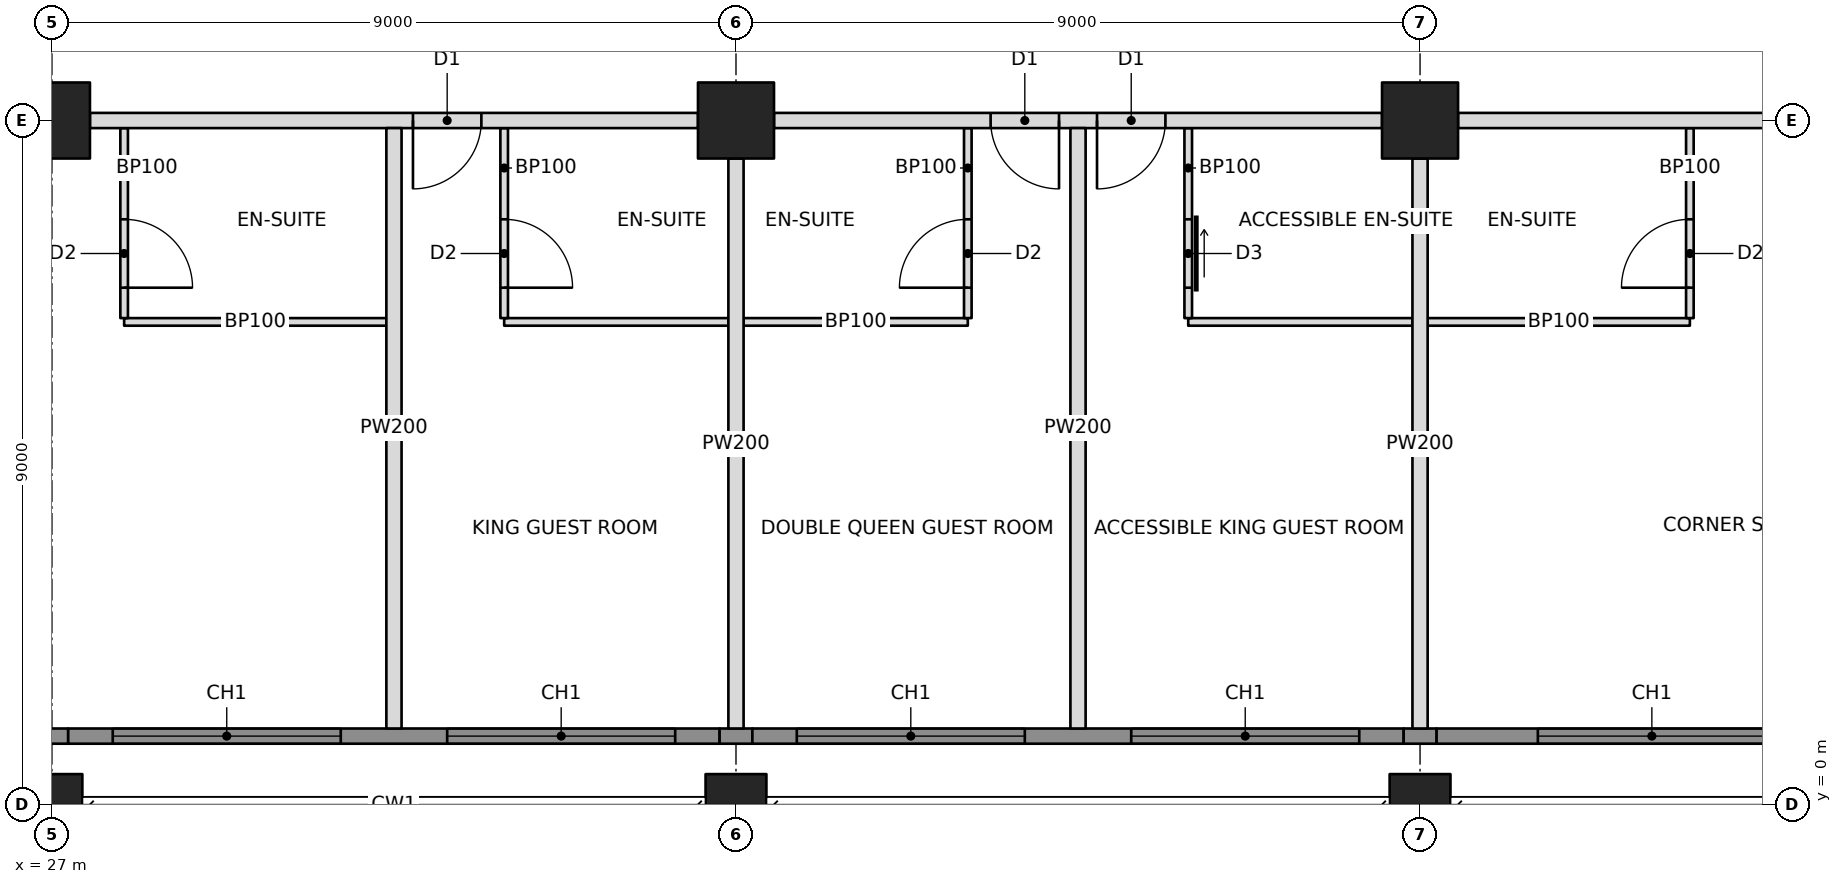
"""IFC4 building model, lengths in metres.
Left out: names, types, materials, properties, quantities, classifications, styles, units other than length and angle.
Written with IfcOpenShell. Run it as: python <this file> out.ifc"""

import sys

from ifc_helpers import new_model, si_unit, direction, frame, frame_2d, origin, origin_2d, place, context, subcontext, project, spatial, rectangle, hollow_rectangle, extrude, element, fill, save


model = new_model("IFC4")
c1 = context("Model", 3, precision=1e-05, world=origin(), true_north=direction((0.0, 1.0)))
c2 = subcontext(c1, "Body", "Model", "MODEL_VIEW")
j1 = project(units=[si_unit("LENGTHUNIT", "METRE"), si_unit("PLANEANGLEUNIT", "RADIAN")], contexts=[c1])
p1 = place(None, origin())
s1 = spatial("IfcSite", under=j1, at=p1, CompositionType="ELEMENT")
p2 = place(p1, origin())
s2 = spatial("IfcBuilding", under=s1, at=p2, CompositionType="ELEMENT")
p3 = place(p2, frame((0.0, 0.0, 85.8)))
s3 = spatial("IfcBuildingStorey", under=s2, at=p3, CompositionType="ELEMENT", Elevation=85.8)
p4 = place(p3, frame((27.0, 0.0, 0.0), z_axis=(0.0, 0.0, 1.0), x_axis=(1.0, 0.0, 0.0)))
e1 = element("IfcColumn", 1, at=p4, inside=s3, PredefinedType="COLUMN", context=c2, shape_type="SweptSolid", body=[
    extrude(hollow_rectangle(XDim=0.8, YDim=0.8, WallThickness=0.07, at=origin_2d()), origin(), (0.0, 0.0, 1.0), 3.4),
])
p5 = place(p3, frame((27.0, 9.0, 0.0), z_axis=(0.0, 0.0, 1.0), x_axis=(1.0, 0.0, 0.0)))
e2 = element("IfcColumn", 2, at=p5, inside=s3, PredefinedType="COLUMN", context=c2, shape_type="SweptSolid", body=[
    extrude(hollow_rectangle(XDim=1.0, YDim=1.0, WallThickness=0.1, at=origin_2d()), origin(), (0.0, 0.0, 1.0), 3.4),
])
p6 = place(p3, frame((36.0, 0.0, 0.0), z_axis=(0.0, 0.0, 1.0), x_axis=(1.0, 0.0, 0.0)))
e3 = element("IfcColumn", 3, at=p6, inside=s3, PredefinedType="COLUMN", context=c2, shape_type="SweptSolid", body=[
    extrude(hollow_rectangle(XDim=0.8, YDim=0.8, WallThickness=0.07, at=origin_2d()), origin(), (0.0, 0.0, 1.0), 3.4),
])
p7 = place(p3, frame((36.0, 9.0, 0.0), z_axis=(0.0, 0.0, 1.0), x_axis=(0.0, 1.0, 0.0)))
e4 = element("IfcColumn", 4, at=p7, inside=s3, PredefinedType="COLUMN", context=c2, shape_type="SweptSolid", body=[
    extrude(hollow_rectangle(XDim=1.0, YDim=1.0, WallThickness=0.1, at=origin_2d()), origin(), (0.0, 0.0, 1.0), 3.4),
])
p8 = place(p3, frame((45.0, 0.0, 0.0), z_axis=(0.0, 0.0, 1.0), x_axis=(1.0, 0.0, 0.0)))
e5 = element("IfcColumn", 5, at=p8, inside=s3, PredefinedType="COLUMN", context=c2, shape_type="SweptSolid", body=[
    extrude(hollow_rectangle(XDim=0.8, YDim=0.8, WallThickness=0.07, at=origin_2d()), origin(), (0.0, 0.0, 1.0), 3.4),
])
p9 = place(p3, frame((45.0, 9.0, 0.0), z_axis=(0.0, 0.0, 1.0), x_axis=(0.0, 1.0, 0.0)))
e6 = element("IfcColumn", 6, at=p9, inside=s3, PredefinedType="COLUMN", context=c2, shape_type="SweptSolid", body=[
    extrude(hollow_rectangle(XDim=1.0, YDim=1.0, WallThickness=0.1, at=origin_2d()), origin(), (0.0, 0.0, 1.0), 3.4),
])
p10 = place(p3, frame((27.5, 9.0, 0.0), z_axis=(0.0, 0.0, 1.0), x_axis=(1.0, 0.0, 0.0)))
e7 = element("IfcWall", 7, at=p10, inside=s3, PredefinedType="PARTITIONING", context=c2, shape_type="SweptSolid", body=[
    extrude(rectangle(XDim=8.0, YDim=0.2, at=frame_2d((4.0, 0.0))), origin(), (0.0, 0.0, 1.0), 2.21),
])
p11 = place(p10, frame((4.25, 0.0, 0.0)))
e8 = element("IfcOpeningElement", 8, at=p11, cuts=e7, PredefinedType="OPENING", context=c2, shape_type="SweptSolid", body=[
    extrude(rectangle(XDim=0.9, YDim=2.1, at=frame_2d((0.45, 1.05))), frame((0.0, 0.11, 0.0), z_axis=(0.0, -1.0, 0.0), x_axis=(1.0, 0.0, 0.0)), (0.0, 0.0, 1.0), 0.22),
])
p12 = place(p3, frame((36.5, 9.0, 0.0), z_axis=(0.0, 0.0, 1.0), x_axis=(1.0, 0.0, 0.0)))
e9 = element("IfcWall", 9, at=p12, inside=s3, PredefinedType="PARTITIONING", context=c2, shape_type="SweptSolid", body=[
    extrude(rectangle(XDim=8.0, YDim=0.2, at=frame_2d((4.0, 0.0))), origin(), (0.0, 0.0, 1.0), 2.21),
])
p13 = place(p12, frame((2.85, 0.0, 0.0)))
e10 = element("IfcOpeningElement", 10, at=p13, cuts=e9, PredefinedType="OPENING", context=c2, shape_type="SweptSolid", body=[
    extrude(rectangle(XDim=0.9, YDim=2.1, at=frame_2d((0.45, 1.05))), frame((0.0, 0.11, 0.0), z_axis=(0.0, -1.0, 0.0), x_axis=(1.0, 0.0, 0.0)), (0.0, 0.0, 1.0), 0.22),
])
p14 = place(p12, frame((4.25, 0.0, 0.0)))
e11 = element("IfcOpeningElement", 11, at=p14, cuts=e9, PredefinedType="OPENING", context=c2, shape_type="SweptSolid", body=[
    extrude(rectangle(XDim=0.9, YDim=2.1, at=frame_2d((0.45, 1.05))), frame((0.0, 0.11, 0.0), z_axis=(0.0, -1.0, 0.0), x_axis=(1.0, 0.0, 0.0)), (0.0, 0.0, 1.0), 0.22),
])
p15 = place(p3, frame((45.5, 9.0, 0.0), z_axis=(0.0, 0.0, 1.0), x_axis=(1.0, 0.0, 0.0)))
e12 = element("IfcWall", 12, at=p15, inside=s3, PredefinedType="PARTITIONING", context=c2, shape_type="SweptSolid", body=[
    extrude(rectangle(XDim=7.5, YDim=0.2, at=frame_2d((3.75, 0.0))), origin(), (0.0, 0.0, 1.0), 2.21),
])
p16 = place(p15, frame((6.35, 0.0, 0.0)))
e13 = element("IfcOpeningElement", 13, at=p16, cuts=e12, PredefinedType="OPENING", context=c2, shape_type="SweptSolid", body=[
    extrude(rectangle(XDim=0.9, YDim=2.1, at=frame_2d((0.45, 1.05))), frame((0.0, 0.11, 0.0), z_axis=(0.0, -1.0, 0.0), x_axis=(1.0, 0.0, 0.0)), (0.0, 0.0, 1.0), 0.22),
])
p17 = place(p3, frame((31.5, 8.9, 0.0), z_axis=(0.0, 0.0, 1.0), x_axis=(0.0, -1.0, 0.0)))
e14 = element("IfcWall", 14, at=p17, inside=s3, PredefinedType="PARTITIONING", context=c2, shape_type="SweptSolid", body=[
    extrude(rectangle(XDim=7.9, YDim=0.2, at=frame_2d((3.95, 0.0))), origin(), (0.0, 0.0, 1.0), 2.21),
])
p18 = place(p3, frame((36.0, 8.5, 0.0), z_axis=(0.0, 0.0, 1.0), x_axis=(0.0, -1.0, 0.0)))
e15 = element("IfcWall", 15, at=p18, inside=s3, PredefinedType="PARTITIONING", context=c2, shape_type="SweptSolid", body=[
    extrude(rectangle(XDim=7.5, YDim=0.2, at=frame_2d((3.75, 0.0))), origin(), (0.0, 0.0, 1.0), 2.21),
])
p19 = place(p3, frame((40.5, 8.9, 0.0), z_axis=(0.0, 0.0, 1.0), x_axis=(0.0, -1.0, 0.0)))
e16 = element("IfcWall", 16, at=p19, inside=s3, PredefinedType="PARTITIONING", context=c2, shape_type="SweptSolid", body=[
    extrude(rectangle(XDim=7.9, YDim=0.2, at=frame_2d((3.95, 0.0))), origin(), (0.0, 0.0, 1.0), 2.21),
])
p20 = place(p3, frame((45.0, 8.5, 0.0), z_axis=(0.0, 0.0, 1.0), x_axis=(0.0, -1.0, 0.0)))
e17 = element("IfcWall", 17, at=p20, inside=s3, PredefinedType="PARTITIONING", context=c2, shape_type="SweptSolid", body=[
    extrude(rectangle(XDim=7.5, YDim=0.2, at=frame_2d((3.75, 0.0))), origin(), (0.0, 0.0, 1.0), 2.21),
])
p21 = place(p3, frame((27.95, 6.35, 0.0), z_axis=(0.0, 0.0, 1.0), x_axis=(1.0, 0.0, 0.0)))
e18 = element("IfcWall", 18, at=p21, inside=s3, PredefinedType="PARTITIONING", context=c2, shape_type="SweptSolid", body=[
    extrude(rectangle(XDim=3.45, YDim=0.1, at=frame_2d((1.725, 0.0))), origin(), (0.0, 0.0, 1.0), 3.15),
])
p22 = place(p3, frame((27.95, 8.9, 0.0), z_axis=(0.0, 0.0, 1.0), x_axis=(0.0, -1.0, 0.0)))
e19 = element("IfcWall", 19, at=p22, inside=s3, PredefinedType="PARTITIONING", context=c2, shape_type="SweptSolid", body=[
    extrude(rectangle(XDim=2.5, YDim=0.1, at=frame_2d((1.25, 0.0))), origin(), (0.0, 0.0, 1.0), 2.21),
])
p23 = place(p22, frame((1.2, 0.0, 0.0)))
e20 = element("IfcOpeningElement", 20, at=p23, cuts=e19, PredefinedType="OPENING", context=c2, shape_type="SweptSolid", body=[
    extrude(rectangle(XDim=0.9, YDim=2.1, at=frame_2d((0.45, 1.05))), frame((0.0, 0.06, 0.0), z_axis=(0.0, -1.0, 0.0), x_axis=(1.0, 0.0, 0.0)), (0.0, 0.0, 1.0), 0.12),
])
p24 = place(p3, frame((32.95, 6.35, 0.0), z_axis=(0.0, 0.0, 1.0), x_axis=(1.0, 0.0, 0.0)))
e21 = element("IfcWall", 21, at=p24, inside=s3, PredefinedType="PARTITIONING", context=c2, shape_type="SweptSolid", body=[
    extrude(rectangle(XDim=2.95, YDim=0.1, at=frame_2d((1.475, 0.0))), origin(), (0.0, 0.0, 1.0), 2.21),
])
p25 = place(p3, frame((32.95, 8.9, 0.0), z_axis=(0.0, 0.0, 1.0), x_axis=(0.0, -1.0, 0.0)))
e22 = element("IfcWall", 22, at=p25, inside=s3, PredefinedType="PARTITIONING", context=c2, shape_type="SweptSolid", body=[
    extrude(rectangle(XDim=2.5, YDim=0.1, at=frame_2d((1.25, 0.0))), origin(), (0.0, 0.0, 1.0), 2.21),
])
p26 = place(p25, frame((1.2, 0.0, 0.0)))
e23 = element("IfcOpeningElement", 23, at=p26, cuts=e22, PredefinedType="OPENING", context=c2, shape_type="SweptSolid", body=[
    extrude(rectangle(XDim=0.9, YDim=2.1, at=frame_2d((0.45, 1.05))), frame((0.0, 0.06, 0.0), z_axis=(0.0, -1.0, 0.0), x_axis=(1.0, 0.0, 0.0)), (0.0, 0.0, 1.0), 0.12),
])
p27 = place(p3, frame((36.1, 6.35, 0.0), z_axis=(0.0, 0.0, 1.0), x_axis=(1.0, 0.0, 0.0)))
e24 = element("IfcWall", 24, at=p27, inside=s3, PredefinedType="PARTITIONING", context=c2, shape_type="SweptSolid", body=[
    extrude(rectangle(XDim=2.95, YDim=0.1, at=frame_2d((1.475, 0.0))), origin(), (0.0, 0.0, 1.0), 2.21),
])
p28 = place(p3, frame((39.05, 8.9, 0.0), z_axis=(0.0, 0.0, 1.0), x_axis=(0.0, -1.0, 0.0)))
e25 = element("IfcWall", 25, at=p28, inside=s3, PredefinedType="PARTITIONING", context=c2, shape_type="SweptSolid", body=[
    extrude(rectangle(XDim=2.5, YDim=0.1, at=frame_2d((1.25, 0.0))), origin(), (0.0, 0.0, 1.0), 2.21),
])
p29 = place(p28, frame((1.2, 0.0, 0.0)))
e26 = element("IfcOpeningElement", 26, at=p29, cuts=e25, PredefinedType="OPENING", context=c2, shape_type="SweptSolid", body=[
    extrude(rectangle(XDim=0.9, YDim=2.1, at=frame_2d((0.45, 1.05))), frame((0.0, 0.06, 0.0), z_axis=(0.0, -1.0, 0.0), x_axis=(1.0, 0.0, 0.0)), (0.0, 0.0, 1.0), 0.12),
])
p30 = place(p3, frame((41.95, 6.35, 0.0), z_axis=(0.0, 0.0, 1.0), x_axis=(1.0, 0.0, 0.0)))
e27 = element("IfcWall", 27, at=p30, inside=s3, PredefinedType="PARTITIONING", context=c2, shape_type="SweptSolid", body=[
    extrude(rectangle(XDim=2.95, YDim=0.1, at=frame_2d((1.475, 0.0))), origin(), (0.0, 0.0, 1.0), 2.21),
])
p31 = place(p3, frame((41.95, 8.9, 0.0), z_axis=(0.0, 0.0, 1.0), x_axis=(0.0, -1.0, 0.0)))
e28 = element("IfcWall", 28, at=p31, inside=s3, PredefinedType="PARTITIONING", context=c2, shape_type="SweptSolid", body=[
    extrude(rectangle(XDim=2.5, YDim=0.1, at=frame_2d((1.25, 0.0))), origin(), (0.0, 0.0, 1.0), 2.21),
])
p32 = place(p31, frame((1.2, 0.0, 0.0)))
e29 = element("IfcOpeningElement", 29, at=p32, cuts=e28, PredefinedType="OPENING", context=c2, shape_type="SweptSolid", body=[
    extrude(rectangle(XDim=0.9, YDim=2.1, at=frame_2d((0.45, 1.05))), frame((0.0, 0.06, 0.0), z_axis=(0.0, -1.0, 0.0), x_axis=(1.0, 0.0, 0.0)), (0.0, 0.0, 1.0), 0.12),
])
p33 = place(p3, frame((45.1, 6.35, 0.0), z_axis=(0.0, 0.0, 1.0), x_axis=(1.0, 0.0, 0.0)))
e30 = element("IfcWall", 30, at=p33, inside=s3, PredefinedType="PARTITIONING", context=c2, shape_type="SweptSolid", body=[
    extrude(rectangle(XDim=3.45, YDim=0.1, at=frame_2d((1.725, 0.0))), origin(), (0.0, 0.0, 1.0), 2.21),
])
p34 = place(p3, frame((48.55, 8.9, 0.0), z_axis=(0.0, 0.0, 1.0), x_axis=(0.0, -1.0, 0.0)))
e31 = element("IfcWall", 31, at=p34, inside=s3, PredefinedType="PARTITIONING", context=c2, shape_type="SweptSolid", body=[
    extrude(rectangle(XDim=2.5, YDim=0.1, at=frame_2d((1.25, 0.0))), origin(), (0.0, 0.0, 1.0), 2.21),
])
p35 = place(p34, frame((1.2, 0.0, 0.0)))
e32 = element("IfcOpeningElement", 32, at=p35, cuts=e31, PredefinedType="OPENING", context=c2, shape_type="SweptSolid", body=[
    extrude(rectangle(XDim=0.9, YDim=2.1, at=frame_2d((0.45, 1.05))), frame((0.0, 0.06, 0.0), z_axis=(0.0, -1.0, 0.0), x_axis=(1.0, 0.0, 0.0)), (0.0, 0.0, 1.0), 0.12),
])
p36 = place(p3, frame((26.786, 0.9, 0.0), z_axis=(0.0, 0.0, 1.0), x_axis=(1.0, 0.0, 0.0)))
e33 = element("IfcWall", 33, at=p36, inside=s3, PredefinedType="SOLIDWALL", context=c2, shape_type="SweptSolid", body=[
    extrude(rectangle(XDim=0.428, YDim=0.2, at=frame_2d((0.214, 0.0))), origin(), (0.0, 0.0, 1.0), 2.202),
])
p37 = place(p3, frame((27.214, 0.9, 0.0), z_axis=(0.0, 0.0, 1.0), x_axis=(1.0, 0.0, 0.0)))
e34 = element("IfcWall", 34, at=p37, inside=s3, PredefinedType="SOLIDWALL", context=c2, shape_type="SweptSolid", body=[
    extrude(rectangle(XDim=8.571, YDim=0.2, at=frame_2d((4.285, 0.0))), origin(), (0.0, 0.0, 1.0), 3.15),
])
p38 = place(p37, frame((0.586, 0.0, 0.6)))
e35 = element("IfcOpeningElement", 35, at=p38, cuts=e34, PredefinedType="OPENING", context=c2, shape_type="SweptSolid", body=[
    extrude(rectangle(XDim=3.0, YDim=2.2, at=frame_2d((1.5, 1.1))), frame((0.0, 0.11, 0.0), z_axis=(0.0, -1.0, 0.0), x_axis=(1.0, 0.0, 0.0)), (0.0, 0.0, 1.0), 0.22),
])
p39 = place(p37, frame((4.986, 0.0, 0.6)))
e36 = element("IfcOpeningElement", 36, at=p39, cuts=e34, PredefinedType="OPENING", context=c2, shape_type="SweptSolid", body=[
    extrude(rectangle(XDim=3.0, YDim=2.2, at=frame_2d((1.5, 1.1))), frame((0.0, 0.11, 0.0), z_axis=(0.0, -1.0, 0.0), x_axis=(1.0, 0.0, 0.0)), (0.0, 0.0, 1.0), 0.22),
])
p40 = place(p3, frame((35.785, 0.9, 0.0), z_axis=(0.0, 0.0, 1.0), x_axis=(1.0, 0.0, 0.0)))
e37 = element("IfcWall", 37, at=p40, inside=s3, PredefinedType="SOLIDWALL", context=c2, shape_type="SweptSolid", body=[
    extrude(rectangle(XDim=0.431, YDim=0.2, at=frame_2d((0.215, 0.0))), origin(), (0.0, 0.0, 1.0), 2.21),
])
p41 = place(p3, frame((36.215, 0.9, 0.0), z_axis=(0.0, 0.0, 1.0), x_axis=(1.0, 0.0, 0.0)))
e38 = element("IfcWall", 38, at=p41, inside=s3, PredefinedType="SOLIDWALL", context=c2, shape_type="SweptSolid", body=[
    extrude(rectangle(XDim=8.569, YDim=0.2, at=frame_2d((4.285, 0.0))), origin(), (0.0, 0.0, 1.0), 3.15),
])
p42 = place(p41, frame((0.585, 0.0, 0.6)))
e39 = element("IfcOpeningElement", 39, at=p42, cuts=e38, PredefinedType="OPENING", context=c2, shape_type="SweptSolid", body=[
    extrude(rectangle(XDim=3.0, YDim=2.2, at=frame_2d((1.5, 1.1))), frame((0.0, 0.11, 0.0), z_axis=(0.0, -1.0, 0.0), x_axis=(1.0, 0.0, 0.0)), (0.0, 0.0, 1.0), 0.22),
])
p43 = place(p41, frame((4.985, 0.0, 0.6)))
e40 = element("IfcOpeningElement", 40, at=p43, cuts=e38, PredefinedType="OPENING", context=c2, shape_type="SweptSolid", body=[
    extrude(rectangle(XDim=3.0, YDim=2.2, at=frame_2d((1.5, 1.1))), frame((0.0, 0.11, 0.0), z_axis=(0.0, -1.0, 0.0), x_axis=(1.0, 0.0, 0.0)), (0.0, 0.0, 1.0), 0.22),
])
p44 = place(p3, frame((44.785, 0.9, 0.0), z_axis=(0.0, 0.0, 1.0), x_axis=(1.0, 0.0, 0.0)))
e41 = element("IfcWall", 41, at=p44, inside=s3, PredefinedType="SOLIDWALL", context=c2, shape_type="SweptSolid", body=[
    extrude(rectangle(XDim=0.431, YDim=0.2, at=frame_2d((0.215, 0.0))), origin(), (0.0, 0.0, 1.0), 2.21),
])
p45 = place(p3, frame((45.215, 0.9, 0.0), z_axis=(0.0, 0.0, 1.0), x_axis=(1.0, 0.0, 0.0)))
e42 = element("IfcWall", 42, at=p45, inside=s3, PredefinedType="SOLIDWALL", context=c2, shape_type="SweptSolid", body=[
    extrude(rectangle(XDim=5.785, YDim=0.2, at=frame_2d((2.892, 0.0))), origin(), (0.0, 0.0, 1.0), 3.15),
])
p46 = place(p45, frame((1.335, 0.0, 0.6)))
e43 = element("IfcOpeningElement", 43, at=p46, cuts=e42, PredefinedType="OPENING", context=c2, shape_type="SweptSolid", body=[
    extrude(rectangle(XDim=3.0, YDim=2.2, at=frame_2d((1.5, 1.1))), frame((0.0, 0.11, 0.0), z_axis=(0.0, -1.0, 0.0), x_axis=(1.0, 0.0, 0.0)), (0.0, 0.0, 1.0), 0.22),
])
p47 = place(p38, origin())
e44 = element("IfcWindow", 44, at=p47, inside=s3, PartitioningType="TRIPLE_PANEL_VERTICAL", PredefinedType="WINDOW", context=c2, shape_type="SweptSolid", body=[
    extrude(rectangle(XDim=3.0, YDim=2.2, at=frame_2d((1.5, 1.1))), frame((0.0, 0.03, 0.0), z_axis=(0.0, -1.0, 0.0), x_axis=(1.0, 0.0, 0.0)), (0.0, 0.0, 1.0), 0.06),
])
fill(e35, e44)
p48 = place(p39, origin())
e45 = element("IfcWindow", 45, at=p48, inside=s3, PartitioningType="TRIPLE_PANEL_VERTICAL", PredefinedType="WINDOW", context=c2, shape_type="SweptSolid", body=[
    extrude(rectangle(XDim=3.0, YDim=2.2, at=frame_2d((1.5, 1.1))), frame((0.0, 0.03, 0.0), z_axis=(0.0, -1.0, 0.0), x_axis=(1.0, 0.0, 0.0)), (0.0, 0.0, 1.0), 0.06),
])
fill(e36, e45)
p49 = place(p42, origin())
e46 = element("IfcWindow", 46, at=p49, inside=s3, PartitioningType="TRIPLE_PANEL_VERTICAL", PredefinedType="WINDOW", context=c2, shape_type="SweptSolid", body=[
    extrude(rectangle(XDim=3.0, YDim=2.2, at=frame_2d((1.5, 1.1))), frame((0.0, 0.03, 0.0), z_axis=(0.0, -1.0, 0.0), x_axis=(1.0, 0.0, 0.0)), (0.0, 0.0, 1.0), 0.06),
])
fill(e39, e46)
p50 = place(p43, origin())
e47 = element("IfcWindow", 47, at=p50, inside=s3, PartitioningType="TRIPLE_PANEL_VERTICAL", PredefinedType="WINDOW", context=c2, shape_type="SweptSolid", body=[
    extrude(rectangle(XDim=3.0, YDim=2.2, at=frame_2d((1.5, 1.1))), frame((0.0, 0.03, 0.0), z_axis=(0.0, -1.0, 0.0), x_axis=(1.0, 0.0, 0.0)), (0.0, 0.0, 1.0), 0.06),
])
fill(e40, e47)
p51 = place(p46, origin())
e48 = element("IfcWindow", 48, at=p51, inside=s3, PartitioningType="TRIPLE_PANEL_VERTICAL", PredefinedType="WINDOW", context=c2, shape_type="SweptSolid", body=[
    extrude(rectangle(XDim=3.0, YDim=2.2, at=frame_2d((1.5, 1.1))), frame((0.0, 0.03, 0.0), z_axis=(0.0, -1.0, 0.0), x_axis=(1.0, 0.0, 0.0)), (0.0, 0.0, 1.0), 0.06),
])
fill(e43, e48)
p52 = place(p23, origin())
e49 = element("IfcDoor", 49, at=p52, inside=s3, OperationType="SINGLE_SWING_RIGHT", PredefinedType="DOOR", context=c2, shape_type="SweptSolid", body=[
    extrude(rectangle(XDim=0.9, YDim=2.1, at=frame_2d((0.45, 1.05))), frame((0.0, 0.025, 0.0), z_axis=(0.0, -1.0, 0.0), x_axis=(1.0, 0.0, 0.0)), (0.0, 0.0, 1.0), 0.05),
])
fill(e20, e49)
p53 = place(p26, origin())
e50 = element("IfcDoor", 50, at=p53, inside=s3, OperationType="SINGLE_SWING_RIGHT", PredefinedType="DOOR", context=c2, shape_type="SweptSolid", body=[
    extrude(rectangle(XDim=0.9, YDim=2.1, at=frame_2d((0.45, 1.05))), frame((0.0, 0.025, 0.0), z_axis=(0.0, -1.0, 0.0), x_axis=(1.0, 0.0, 0.0)), (0.0, 0.0, 1.0), 0.05),
])
fill(e23, e50)
p54 = place(p11, frame((0.9, 0.0, 0.0), z_axis=(0.0, 0.0, 1.0), x_axis=(-1.0, 0.0, 0.0)))
e51 = element("IfcDoor", 51, at=p54, inside=s3, OperationType="SINGLE_SWING_RIGHT", PredefinedType="DOOR", context=c2, shape_type="SweptSolid", body=[
    extrude(rectangle(XDim=0.9, YDim=2.1, at=frame_2d((0.45, 1.05))), frame((0.0, 0.025, 0.0), z_axis=(0.0, -1.0, 0.0), x_axis=(1.0, 0.0, 0.0)), (0.0, 0.0, 1.0), 0.05),
])
fill(e8, e51)
p55 = place(p29, frame((0.9, 0.0, 0.0), z_axis=(0.0, 0.0, 1.0), x_axis=(-1.0, 0.0, 0.0)))
e52 = element("IfcDoor", 52, at=p55, inside=s3, OperationType="SINGLE_SWING_LEFT", PredefinedType="DOOR", context=c2, shape_type="SweptSolid", body=[
    extrude(rectangle(XDim=0.9, YDim=2.1, at=frame_2d((0.45, 1.05))), frame((0.0, 0.025, 0.0), z_axis=(0.0, -1.0, 0.0), x_axis=(1.0, 0.0, 0.0)), (0.0, 0.0, 1.0), 0.05),
])
fill(e26, e52)
p56 = place(p13, frame((0.9, 0.0, 0.0), z_axis=(0.0, 0.0, 1.0), x_axis=(-1.0, 0.0, 0.0)))
e53 = element("IfcDoor", 53, at=p56, inside=s3, OperationType="SINGLE_SWING_LEFT", PredefinedType="DOOR", context=c2, shape_type="SweptSolid", body=[
    extrude(rectangle(XDim=0.9, YDim=2.1, at=frame_2d((0.45, 1.05))), frame((0.0, 0.025, 0.0), z_axis=(0.0, -1.0, 0.0), x_axis=(1.0, 0.0, 0.0)), (0.0, 0.0, 1.0), 0.05),
])
fill(e10, e53)
p57 = place(p32, origin())
e54 = element("IfcDoor", 54, at=p57, inside=s3, OperationType="SLIDING_TO_LEFT", PredefinedType="DOOR", context=c2, shape_type="SweptSolid", body=[
    extrude(rectangle(XDim=0.9, YDim=2.1, at=frame_2d((0.45, 1.05))), frame((0.0, 0.025, 0.0), z_axis=(0.0, -1.0, 0.0), x_axis=(1.0, 0.0, 0.0)), (0.0, 0.0, 1.0), 0.05),
])
fill(e29, e54)
p58 = place(p14, frame((0.9, 0.0, 0.0), z_axis=(0.0, 0.0, 1.0), x_axis=(-1.0, 0.0, 0.0)))
e55 = element("IfcDoor", 55, at=p58, inside=s3, OperationType="SINGLE_SWING_RIGHT", PredefinedType="DOOR", context=c2, shape_type="SweptSolid", body=[
    extrude(rectangle(XDim=0.9, YDim=2.1, at=frame_2d((0.45, 1.05))), frame((0.0, 0.025, 0.0), z_axis=(0.0, -1.0, 0.0), x_axis=(1.0, 0.0, 0.0)), (0.0, 0.0, 1.0), 0.05),
])
fill(e11, e55)
p59 = place(p35, frame((0.9, 0.0, 0.0), z_axis=(0.0, 0.0, 1.0), x_axis=(-1.0, 0.0, 0.0)))
e56 = element("IfcDoor", 56, at=p59, inside=s3, OperationType="SINGLE_SWING_LEFT", PredefinedType="DOOR", context=c2, shape_type="SweptSolid", body=[
    extrude(rectangle(XDim=0.9, YDim=2.1, at=frame_2d((0.45, 1.05))), frame((0.0, 0.025, 0.0), z_axis=(0.0, -1.0, 0.0), x_axis=(1.0, 0.0, 0.0)), (0.0, 0.0, 1.0), 0.05),
])
fill(e32, e56)
save(model, sys.argv[1])
